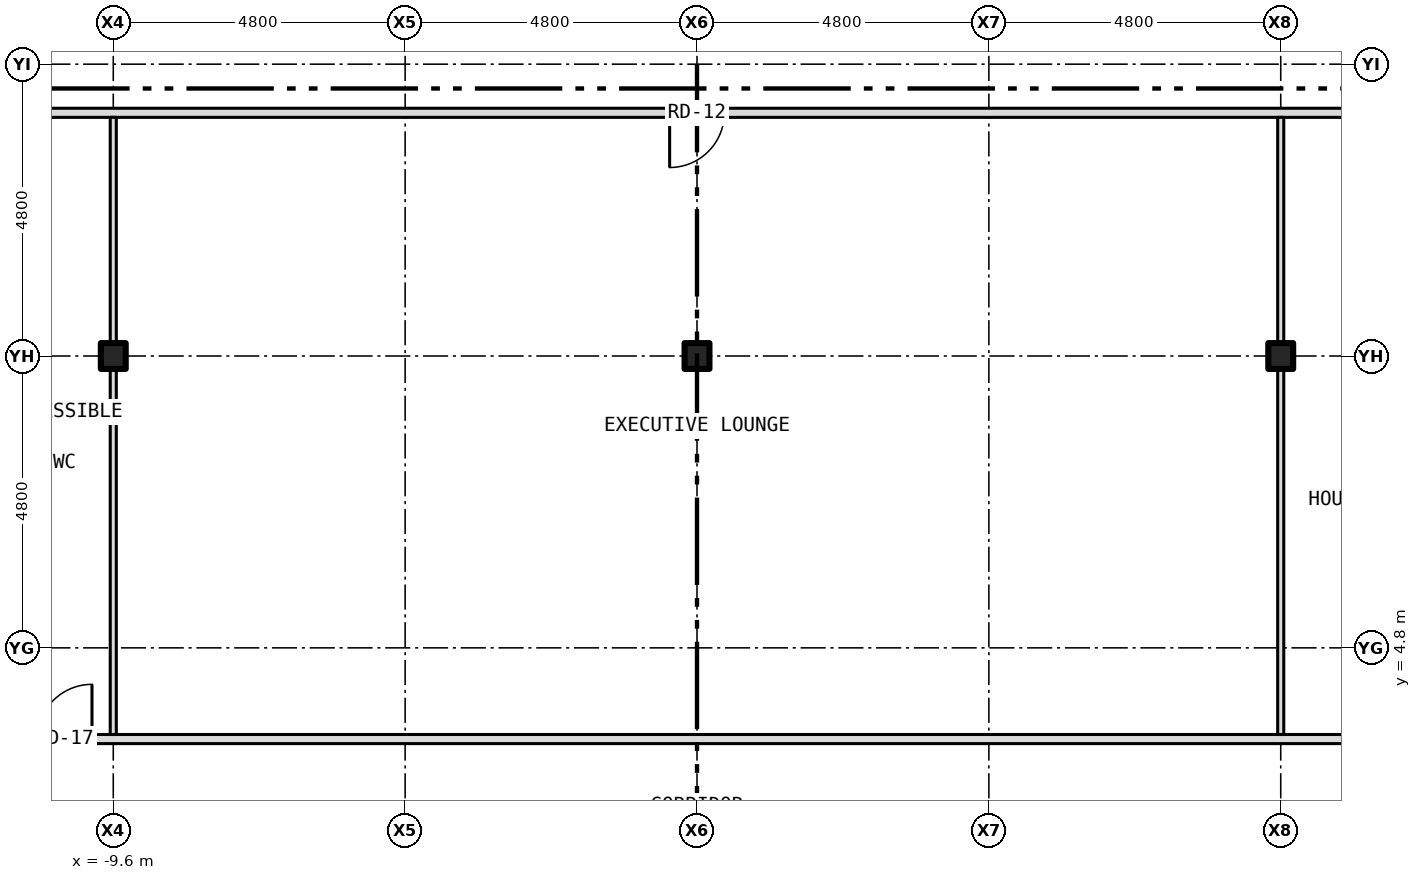
"""IFC4 building model, lengths in metres.
Left out: names, types, materials, properties, quantities, classifications, styles, units other than length and angle.
Written with IfcOpenShell. Run it as: python <this file> out.ifc"""

import sys

from ifc_helpers import new_model, si_unit, direction, frame, frame_2d, origin, origin_2d, place, context, subcontext, project, spatial, rectangle, i_section, extrude, element, fill, save


model = new_model("IFC4")
c1 = context("Model", 3, precision=1e-05, world=origin(), true_north=direction((0.0, 1.0)))
c2 = subcontext(c1, "Body", "Model", "MODEL_VIEW")
j1 = project(units=[si_unit("LENGTHUNIT", "METRE"), si_unit("PLANEANGLEUNIT", "RADIAN")], contexts=[c1])
p1 = place(None, origin())
s1 = spatial("IfcSite", under=j1, at=p1, CompositionType="ELEMENT")
p2 = place(p1, origin())
s2 = spatial("IfcBuilding", under=s1, at=p2, CompositionType="ELEMENT")
p3 = place(p2, frame((0.0, 0.0, 42.5)))
s3 = spatial("IfcBuildingStorey", under=s2, at=p3, CompositionType="ELEMENT", Elevation=42.5)
for number, where, z_axis, x_axis in (
    (1, (-9.6, 9.6, -0.15), (0.0, 0.0, 1.0), (1.0, 0.0, 0.0)),
    (2, (0.0, 9.6, -0.15), (0.0, 0.0, 1.0), (1.0, 0.0, 0.0)),
    (3, (9.6, 9.6, -0.15), (0.0, 0.0, 1.0), (1.0, 0.0, 0.0)),
):
    element("IfcColumn", number, at=place(p3, frame(where, z_axis=z_axis, x_axis=x_axis)), inside=s3, PredefinedType="COLUMN", context=c2, shape_type="SweptSolid", body=[
        extrude(i_section(OverallWidth=0.409, OverallDepth=0.424, WebThickness=0.033, FlangeThickness=0.052, at=origin_2d()), origin(), (0.0, 0.0, 1.0), 3.5),
    ])
p4 = place(p3, frame((-12.8, 3.3, 0.0), z_axis=(0.0, 0.0, 1.0), x_axis=(1.0, 0.0, 0.0)))
e4 = element("IfcWall", 4, at=p4, inside=s3, PredefinedType="PARTITIONING", context=c2, shape_type="SweptSolid", body=[
    extrude(rectangle(XDim=25.6, YDim=0.15, at=frame_2d((12.8, 0.0))), origin(), (0.0, 0.0, 1.0), 3.35),
])
p5 = place(p4, frame((1.95, 0.0, 0.0)))
e5 = element("IfcOpeningElement", 5, at=p5, cuts=e4, PredefinedType="OPENING", context=c2, shape_type="SweptSolid", body=[
    extrude(rectangle(XDim=0.9, YDim=2.1, at=frame_2d((0.45, 1.05))), frame((0.0, 0.087, 0.0), z_axis=(0.0, -1.0, 0.0), x_axis=(1.0, 0.0, 0.0)), (0.0, 0.0, 1.0), 0.174),
])
p6 = place(p3, frame((-12.8, 13.6, 0.0), z_axis=(0.0, 0.0, 1.0), x_axis=(1.0, 0.0, 0.0)))
e6 = element("IfcWall", 6, at=p6, inside=s3, PredefinedType="PARTITIONING", context=c2, shape_type="SweptSolid", body=[
    extrude(rectangle(XDim=25.6, YDim=0.15, at=frame_2d((12.8, 0.0))), origin(), (0.0, 0.0, 1.0), 3.35),
])
p7 = place(p6, frame((12.35, 0.0, 0.0)))
e7 = element("IfcOpeningElement", 7, at=p7, cuts=e6, PredefinedType="OPENING", context=c2, shape_type="SweptSolid", body=[
    extrude(rectangle(XDim=0.9, YDim=2.1, at=frame_2d((0.45, 1.05))), frame((0.0, 0.087, 0.0), z_axis=(0.0, -1.0, 0.0), x_axis=(1.0, 0.0, 0.0)), (0.0, 0.0, 1.0), 0.174),
])
p8 = place(p3, frame((-9.6, 3.375, 0.0), z_axis=(0.0, 0.0, 1.0), x_axis=(0.0, 1.0, 0.0)))
e8 = element("IfcWall", 8, at=p8, inside=s3, PredefinedType="PARTITIONING", context=c2, shape_type="SweptSolid", body=[
    extrude(rectangle(XDim=6.021, YDim=0.1, at=frame_2d((3.01, 0.0))), origin(), (0.0, 0.0, 1.0), 2.728),
])
p9 = place(p3, frame((-9.6, 9.396, 0.0), z_axis=(0.0, 0.0, 1.0), x_axis=(0.0, 1.0, 0.0)))
e9 = element("IfcWall", 9, at=p9, inside=s3, PredefinedType="PARTITIONING", context=c2, shape_type="SweptSolid", body=[
    extrude(rectangle(XDim=0.408, YDim=0.1, at=frame_2d((0.204, 0.0))), origin(), (0.0, 0.0, 1.0), 3.35),
])
p10 = place(p3, frame((-9.6, 9.804, 0.0), z_axis=(0.0, 0.0, 1.0), x_axis=(0.0, 1.0, 0.0)))
e10 = element("IfcWall", 10, at=p10, inside=s3, PredefinedType="PARTITIONING", context=c2, shape_type="SweptSolid", body=[
    extrude(rectangle(XDim=3.721, YDim=0.1, at=frame_2d((1.86, 0.0))), origin(), (0.0, 0.0, 1.0), 2.728),
])
p11 = place(p3, frame((9.6, 3.375, 0.0), z_axis=(0.0, 0.0, 1.0), x_axis=(0.0, 1.0, 0.0)))
e11 = element("IfcWall", 11, at=p11, inside=s3, PredefinedType="PARTITIONING", context=c2, shape_type="SweptSolid", body=[
    extrude(rectangle(XDim=6.021, YDim=0.1, at=frame_2d((3.01, 0.0))), origin(), (0.0, 0.0, 1.0), 2.728),
])
p12 = place(p3, frame((9.6, 9.396, 0.0), z_axis=(0.0, 0.0, 1.0), x_axis=(0.0, 1.0, 0.0)))
e12 = element("IfcWall", 12, at=p12, inside=s3, PredefinedType="PARTITIONING", context=c2, shape_type="SweptSolid", body=[
    extrude(rectangle(XDim=0.408, YDim=0.1, at=frame_2d((0.204, 0.0))), origin(), (0.0, 0.0, 1.0), 3.35),
])
p13 = place(p3, frame((9.6, 9.804, 0.0), z_axis=(0.0, 0.0, 1.0), x_axis=(0.0, 1.0, 0.0)))
e13 = element("IfcWall", 13, at=p13, inside=s3, PredefinedType="PARTITIONING", context=c2, shape_type="SweptSolid", body=[
    extrude(rectangle(XDim=3.721, YDim=0.1, at=frame_2d((1.86, 0.0))), origin(), (0.0, 0.0, 1.0), 2.728),
])
p14 = place(p5, origin())
e14 = element("IfcDoor", 14, at=p14, inside=s3, OperationType="SINGLE_SWING_RIGHT", PredefinedType="DOOR", context=c2, shape_type="SweptSolid", body=[
    extrude(rectangle(XDim=0.9, YDim=2.1, at=frame_2d((0.45, 1.05))), frame((0.0, 0.025, 0.0), z_axis=(0.0, -1.0, 0.0), x_axis=(1.0, 0.0, 0.0)), (0.0, 0.0, 1.0), 0.05),
])
fill(e5, e14)
p15 = place(p7, origin())
e15 = element("IfcDoor", 15, at=p15, inside=s3, OperationType="SINGLE_SWING_LEFT", PredefinedType="DOOR", context=c2, shape_type="SweptSolid", body=[
    extrude(rectangle(XDim=0.9, YDim=2.1, at=frame_2d((0.45, 1.05))), frame((0.0, 0.025, 0.0), z_axis=(0.0, -1.0, 0.0), x_axis=(1.0, 0.0, 0.0)), (0.0, 0.0, 1.0), 0.05),
])
fill(e7, e15)
save(model, sys.argv[1])
